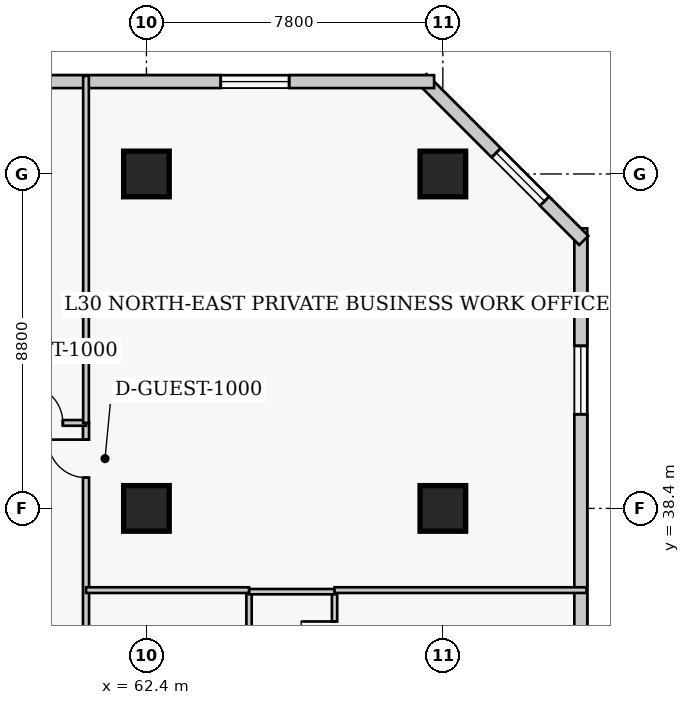
"""IFC4 building model, lengths in metres.
Left out: names, types, materials, properties, quantities, classifications, styles, units other than length and angle.
Written with IfcOpenShell. Run it as: python <this file> out.ifc"""

import sys

from ifc_helpers import new_model, si_unit, direction, frame, frame_2d, origin, origin_2d, place, context, subcontext, project, spatial, rectangle, extrude, element, fill, save


model = new_model("IFC4")
c1 = context("Model", 3, precision=1e-05, world=origin(), true_north=direction((0.0, 1.0)))
c2 = subcontext(c1, "Body", "Model", "MODEL_VIEW")
j1 = project(units=[si_unit("LENGTHUNIT", "METRE"), si_unit("PLANEANGLEUNIT", "RADIAN")], contexts=[c1])
p1 = place(None, origin())
s1 = spatial("IfcSite", under=j1, at=p1, CompositionType="ELEMENT")
p2 = place(p1, origin())
s2 = spatial("IfcBuilding", under=s1, at=p2, CompositionType="ELEMENT")
p3 = place(p2, frame((0.0, 0.0, 122.2)))
s3 = spatial("IfcBuildingStorey", under=s2, at=p3, CompositionType="ELEMENT", Elevation=122.2)
for number, where, z_axis, x_axis in (
    (1, (62.4, 38.4, 0.0), (0.0, 0.0, 1.0), (1.0, 0.0, 0.0)),
    (2, (62.4, 47.2, 0.0), (0.0, 0.0, 1.0), (1.0, 0.0, 0.0)),
    (3, (70.2, 38.4, 0.0), (0.0, 0.0, 1.0), (1.0, 0.0, 0.0)),
    (4, (70.2, 47.2, 0.0), (0.0, 0.0, 1.0), (1.0, 0.0, 0.0)),
):
    element("IfcColumn", number, at=place(p3, frame(where, z_axis=z_axis, x_axis=x_axis)), inside=s3, PredefinedType="COLUMN", context=c2, shape_type="SweptSolid", body=[
        extrude(rectangle(XDim=1.2, YDim=1.2, at=origin_2d()), origin(), (0.0, 0.0, 1.0), 3.8),
    ])
p4 = place(p3, frame((73.83, 13.83, 0.0), z_axis=(0.0, 0.0, 1.0), x_axis=(0.0, 1.0, 0.0)))
e5 = element("IfcWall", 5, at=p4, inside=s3, PredefinedType="SOLIDWALL", context=c2, shape_type="SweptSolid", body=[
    extrude(rectangle(XDim=31.94, YDim=0.34, at=frame_2d((15.97, 0.0))), origin(), (0.0, 0.0, 1.0), 3.54),
])
p5 = place(p4, frame((3.093, 0.0, 0.85)))
e6 = element("IfcOpeningElement", 6, at=p5, cuts=e5, PredefinedType="OPENING", context=c2, shape_type="SweptSolid", body=[
    extrude(rectangle(XDim=1.8, YDim=1.8, at=frame_2d((0.9, 0.9))), frame((0.0, 0.18, 0.0), z_axis=(0.0, -1.0, 0.0), x_axis=(1.0, 0.0, 0.0)), (0.0, 0.0, 1.0), 0.36),
])
p6 = place(p4, frame((11.077, 0.0, 0.85)))
e7 = element("IfcOpeningElement", 7, at=p6, cuts=e5, PredefinedType="OPENING", context=c2, shape_type="SweptSolid", body=[
    extrude(rectangle(XDim=1.8, YDim=1.8, at=frame_2d((0.9, 0.9))), frame((0.0, 0.18, 0.0), z_axis=(0.0, -1.0, 0.0), x_axis=(1.0, 0.0, 0.0)), (0.0, 0.0, 1.0), 0.36),
])
p7 = place(p4, frame((19.062, 0.0, 0.85)))
e8 = element("IfcOpeningElement", 8, at=p7, cuts=e5, PredefinedType="OPENING", context=c2, shape_type="SweptSolid", body=[
    extrude(rectangle(XDim=1.8, YDim=1.8, at=frame_2d((0.9, 0.9))), frame((0.0, 0.18, 0.0), z_axis=(0.0, -1.0, 0.0), x_axis=(1.0, 0.0, 0.0)), (0.0, 0.0, 1.0), 0.36),
])
p8 = place(p4, frame((27.048, 0.0, 0.85)))
e9 = element("IfcOpeningElement", 9, at=p8, cuts=e5, PredefinedType="OPENING", context=c2, shape_type="SweptSolid", body=[
    extrude(rectangle(XDim=1.8, YDim=1.8, at=frame_2d((0.9, 0.9))), frame((0.0, 0.18, 0.0), z_axis=(0.0, -1.0, 0.0), x_axis=(1.0, 0.0, 0.0)), (0.0, 0.0, 1.0), 0.36),
])
p9 = place(p3, frame((73.908, 45.451, 0.0), z_axis=(0.0, 0.0, 1.0), x_axis=(-0.707106781187, 0.707106781187, 0.0)))
e10 = element("IfcWall", 10, at=p9, inside=s3, PredefinedType="SOLIDWALL", context=c2, shape_type="SweptSolid", body=[
    extrude(rectangle(XDim=6.02, YDim=0.34, at=frame_2d((3.01, 0.0))), origin(), (0.0, 0.0, 1.0), 3.54),
])
p10 = place(p9, frame((1.46, 0.0, 0.85)))
e11 = element("IfcOpeningElement", 11, at=p10, cuts=e10, PredefinedType="OPENING", context=c2, shape_type="SweptSolid", body=[
    extrude(rectangle(XDim=1.8, YDim=1.8, at=frame_2d((0.9, 0.9))), frame((0.0, 0.18, 0.0), z_axis=(0.0, -1.0, 0.0), x_axis=(1.0, 0.0, 0.0)), (0.0, 0.0, 1.0), 0.36),
])
p11 = place(p3, frame((69.97, 49.63, 0.0), z_axis=(0.0, 0.0, 1.0), x_axis=(-1.0, 0.0, 0.0)))
e12 = element("IfcWall", 12, at=p11, inside=s3, PredefinedType="SOLIDWALL", context=c2, shape_type="SweptSolid", body=[
    extrude(rectangle(XDim=28.29, YDim=0.34, at=frame_2d((14.145, 0.0))), origin(), (0.0, 0.0, 1.0), 3.54),
])
p12 = place(p11, frame((3.815, 0.0, 0.85)))
e13 = element("IfcOpeningElement", 13, at=p12, cuts=e12, PredefinedType="OPENING", context=c2, shape_type="SweptSolid", body=[
    extrude(rectangle(XDim=1.8, YDim=1.8, at=frame_2d((0.9, 0.9))), frame((0.0, 0.18, 0.0), z_axis=(0.0, -1.0, 0.0), x_axis=(1.0, 0.0, 0.0)), (0.0, 0.0, 1.0), 0.36),
])
p13 = place(p11, frame((13.245, 0.0, 0.85)))
e14 = element("IfcOpeningElement", 14, at=p13, cuts=e12, PredefinedType="OPENING", context=c2, shape_type="SweptSolid", body=[
    extrude(rectangle(XDim=1.8, YDim=1.8, at=frame_2d((0.9, 0.9))), frame((0.0, 0.18, 0.0), z_axis=(0.0, -1.0, 0.0), x_axis=(1.0, 0.0, 0.0)), (0.0, 0.0, 1.0), 0.36),
])
p14 = place(p11, frame((22.675, 0.0, 0.85)))
e15 = element("IfcOpeningElement", 15, at=p14, cuts=e12, PredefinedType="OPENING", context=c2, shape_type="SweptSolid", body=[
    extrude(rectangle(XDim=1.8, YDim=1.8, at=frame_2d((0.9, 0.9))), frame((0.0, 0.18, 0.0), z_axis=(0.0, -1.0, 0.0), x_axis=(1.0, 0.0, 0.0)), (0.0, 0.0, 1.0), 0.36),
])
p15 = place(p3, frame((60.81, 11.85, 0.0), z_axis=(0.0, 0.0, 1.0), x_axis=(0.0, 1.0, 0.0)))
e16 = element("IfcWall", 16, at=p15, inside=s3, PredefinedType="PARTITIONING", context=c2, shape_type="SweptSolid", body=[
    extrude(rectangle(XDim=28.8, YDim=0.16, at=frame_2d((14.4, 0.0))), origin(), (0.0, 0.0, 1.0), 3.54),
])
p16 = place(p15, frame((3.6, 0.0, 0.0)))
e17 = element("IfcOpeningElement", 17, at=p16, cuts=e16, PredefinedType="OPENING", context=c2, shape_type="SweptSolid", body=[
    extrude(rectangle(XDim=0.95, YDim=2.1, at=frame_2d((0.475, 1.05))), frame((0.0, 0.09, 0.0), z_axis=(0.0, -1.0, 0.0), x_axis=(1.0, 0.0, 0.0)), (0.0, 0.0, 1.0), 0.18),
])
p17 = place(p15, frame((12.075, 0.0, 0.0)))
e18 = element("IfcOpeningElement", 18, at=p17, cuts=e16, PredefinedType="OPENING", context=c2, shape_type="SweptSolid", body=[
    extrude(rectangle(XDim=0.95, YDim=2.1, at=frame_2d((0.475, 1.05))), frame((0.0, 0.09, 0.0), z_axis=(0.0, -1.0, 0.0), x_axis=(1.0, 0.0, 0.0)), (0.0, 0.0, 1.0), 0.18),
])
p18 = place(p15, frame((20.2, 0.0, 0.0)))
e19 = element("IfcOpeningElement", 19, at=p18, cuts=e16, PredefinedType="OPENING", context=c2, shape_type="SweptSolid", body=[
    extrude(rectangle(XDim=0.95, YDim=2.1, at=frame_2d((0.475, 1.05))), frame((0.0, 0.09, 0.0), z_axis=(0.0, -1.0, 0.0), x_axis=(1.0, 0.0, 0.0)), (0.0, 0.0, 1.0), 0.18),
])
p19 = place(p15, frame((27.36, 0.0, 0.0)))
e20 = element("IfcOpeningElement", 20, at=p19, cuts=e16, PredefinedType="OPENING", context=c2, shape_type="SweptSolid", body=[
    extrude(rectangle(XDim=1.0, YDim=2.15, at=frame_2d((0.5, 1.075))), frame((0.0, 0.09, 0.0), z_axis=(0.0, -1.0, 0.0), x_axis=(1.0, 0.0, 0.0)), (0.0, 0.0, 1.0), 0.18),
])
p20 = place(p3, frame((56.8, 40.65, 0.0), z_axis=(0.0, 0.0, 1.0), x_axis=(1.0, 0.0, 0.0)))
e21 = element("IfcWall", 21, at=p20, inside=s3, PredefinedType="PARTITIONING", context=c2, shape_type="SweptSolid", body=[
    extrude(rectangle(XDim=4.01, YDim=0.15, at=frame_2d((2.005, 0.0))), origin(), (0.0, 0.0, 1.0), 3.54),
])
p21 = place(p20, frame((2.4, 0.0, 0.0)))
e22 = element("IfcOpeningElement", 22, at=p21, cuts=e21, PredefinedType="OPENING", context=c2, shape_type="SweptSolid", body=[
    extrude(rectangle(XDim=1.0, YDim=2.15, at=frame_2d((0.5, 1.075))), frame((0.0, 0.085, 0.0), z_axis=(0.0, -1.0, 0.0), x_axis=(1.0, 0.0, 0.0)), (0.0, 0.0, 1.0), 0.17),
])
p22 = place(p3, frame((60.81, 40.65, 0.0), z_axis=(0.0, 0.0, 1.0), x_axis=(0.0, 1.0, 0.0)))
e23 = element("IfcWall", 23, at=p22, inside=s3, PredefinedType="PARTITIONING", context=c2, shape_type="SweptSolid", body=[
    extrude(rectangle(XDim=9.13, YDim=0.15, at=frame_2d((4.565, 0.0))), origin(), (0.0, 0.0, 1.0), 3.54),
])
p23 = place(p3, frame((65.1, 33.76, 0.0), z_axis=(0.0, 0.0, 1.0), x_axis=(0.0, 1.0, 0.0)))
e24 = element("IfcWall", 24, at=p23, inside=s3, PredefinedType="PLUMBINGWALL", context=c2, shape_type="SweptSolid", body=[
    extrude(rectangle(XDim=2.45, YDim=0.14, at=frame_2d((1.225, 0.0))), origin(), (0.0, 0.0, 1.0), 3.54),
])
p24 = place(p3, frame((67.35, 33.76, 0.0), z_axis=(0.0, 0.0, 1.0), x_axis=(0.0, 1.0, 0.0)))
e25 = element("IfcWall", 25, at=p24, inside=s3, PredefinedType="PLUMBINGWALL", context=c2, shape_type="SweptSolid", body=[
    extrude(rectangle(XDim=2.45, YDim=0.14, at=frame_2d((1.225, 0.0))), origin(), (0.0, 0.0, 1.0), 3.54),
])
p25 = place(p24, frame((0.785, 0.0, 0.0)))
e26 = element("IfcOpeningElement", 26, at=p25, cuts=e25, PredefinedType="OPENING", context=c2, shape_type="SweptSolid", body=[
    extrude(rectangle(XDim=0.88, YDim=2.05, at=frame_2d((0.44, 1.025))), frame((0.0, 0.08, 0.0), z_axis=(0.0, -1.0, 0.0), x_axis=(1.0, 0.0, 0.0)), (0.0, 0.0, 1.0), 0.16),
])
p26 = place(p3, frame((65.1, 36.21, 0.0), z_axis=(0.0, 0.0, 1.0), x_axis=(1.0, 0.0, 0.0)))
e27 = element("IfcWall", 27, at=p26, inside=s3, PredefinedType="PLUMBINGWALL", context=c2, shape_type="SweptSolid", body=[
    extrude(rectangle(XDim=2.25, YDim=0.14, at=frame_2d((1.125, 0.0))), origin(), (0.0, 0.0, 1.0), 3.54),
])
p27 = place(p3, frame((60.81, 36.25, 0.0), z_axis=(0.0, 0.0, 1.0), x_axis=(1.0, 0.0, 0.0)))
e28 = element("IfcWall", 28, at=p27, inside=s3, PredefinedType="PARTITIONING", context=c2, shape_type="SweptSolid", body=[
    extrude(rectangle(XDim=4.29, YDim=0.15, at=frame_2d((2.145, 0.0))), origin(), (0.0, 0.0, 1.0), 3.54),
])
p28 = place(p3, frame((67.35, 36.25, 0.0), z_axis=(0.0, 0.0, 1.0), x_axis=(1.0, 0.0, 0.0)))
e29 = element("IfcWall", 29, at=p28, inside=s3, PredefinedType="PARTITIONING", context=c2, shape_type="SweptSolid", body=[
    extrude(rectangle(XDim=6.63, YDim=0.15, at=frame_2d((3.315, 0.0))), origin(), (0.0, 0.0, 1.0), 3.54),
])
p29 = place(p8, origin())
e30 = element("IfcWindow", 30, at=p29, inside=s3, PartitioningType="SINGLE_PANEL", PredefinedType="WINDOW", context=c2, shape_type="SweptSolid", body=[
    extrude(rectangle(XDim=1.8, YDim=1.8, at=frame_2d((0.9, 0.9))), frame((0.0, 0.03, 0.0), z_axis=(0.0, -1.0, 0.0), x_axis=(1.0, 0.0, 0.0)), (0.0, 0.0, 1.0), 0.06),
])
fill(e9, e30)
p30 = place(p10, origin())
e31 = element("IfcWindow", 31, at=p30, inside=s3, PartitioningType="SINGLE_PANEL", PredefinedType="WINDOW", context=c2, shape_type="SweptSolid", body=[
    extrude(rectangle(XDim=1.8, YDim=1.8, at=frame_2d((0.9, 0.9))), frame((0.0, 0.03, 0.0), z_axis=(0.0, -1.0, 0.0), x_axis=(1.0, 0.0, 0.0)), (0.0, 0.0, 1.0), 0.06),
])
fill(e11, e31)
p31 = place(p12, origin())
e32 = element("IfcWindow", 32, at=p31, inside=s3, PartitioningType="SINGLE_PANEL", PredefinedType="WINDOW", context=c2, shape_type="SweptSolid", body=[
    extrude(rectangle(XDim=1.8, YDim=1.8, at=frame_2d((0.9, 0.9))), frame((0.0, 0.03, 0.0), z_axis=(0.0, -1.0, 0.0), x_axis=(1.0, 0.0, 0.0)), (0.0, 0.0, 1.0), 0.06),
])
fill(e13, e32)
p32 = place(p21, origin())
e33 = element("IfcDoor", 33, at=p32, inside=s3, OperationType="SINGLE_SWING_LEFT", PredefinedType="DOOR", context=c2, shape_type="SweptSolid", body=[
    extrude(rectangle(XDim=1.0, YDim=2.15, at=frame_2d((0.5, 1.075))), frame((0.0, 0.025, 0.0), z_axis=(0.0, -1.0, 0.0), x_axis=(1.0, 0.0, 0.0)), (0.0, 0.0, 1.0), 0.05),
])
fill(e22, e33)
p33 = place(p25, origin())
e34 = element("IfcDoor", 34, at=p33, inside=s3, OperationType="SINGLE_SWING_RIGHT", PredefinedType="DOOR", context=c2, shape_type="SweptSolid", body=[
    extrude(rectangle(XDim=0.88, YDim=2.05, at=frame_2d((0.44, 1.025))), frame((0.0, 0.025, 0.0), z_axis=(0.0, -1.0, 0.0), x_axis=(1.0, 0.0, 0.0)), (0.0, 0.0, 1.0), 0.05),
])
fill(e26, e34)
p34 = place(p19, origin())
e35 = element("IfcDoor", 35, at=p34, inside=s3, OperationType="SINGLE_SWING_RIGHT", PredefinedType="DOOR", context=c2, shape_type="SweptSolid", body=[
    extrude(rectangle(XDim=1.0, YDim=2.15, at=frame_2d((0.5, 1.075))), frame((0.0, 0.025, 0.0), z_axis=(0.0, -1.0, 0.0), x_axis=(1.0, 0.0, 0.0)), (0.0, 0.0, 1.0), 0.05),
])
fill(e20, e35)
save(model, sys.argv[1])
